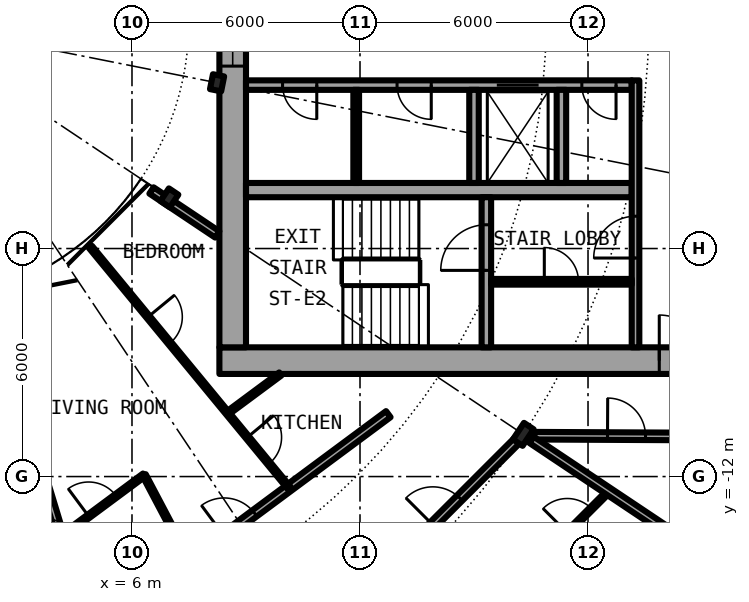
"""IFC4 building model, lengths in metres.
Left out: names, types, materials, properties, quantities, classifications, styles, units other than length and angle.
Written with IfcOpenShell. Run it as: python <this file> out.ifc"""

import sys

from ifc_helpers import new_model, si_unit, direction, frame, frame_2d, origin, origin_2d, place, context, subcontext, project, spatial, rectangle, i_section, extrude, element, fill, save


model = new_model("IFC4")
c1 = context("Model", 3, precision=1e-05, world=origin(), true_north=direction((0.0, 1.0)))
c2 = subcontext(c1, "Body", "Model", "MODEL_VIEW")
j1 = project(units=[si_unit("LENGTHUNIT", "METRE"), si_unit("PLANEANGLEUNIT", "RADIAN")], contexts=[c1])
p1 = place(None, origin())
s1 = spatial("IfcSite", under=j1, at=p1, CompositionType="ELEMENT")
p2 = place(p1, origin())
s2 = spatial("IfcBuilding", under=s1, at=p2, CompositionType="ELEMENT")
p3 = place(p2, frame((0.0, 0.0, 91.05)))
s3 = spatial("IfcBuildingStorey", under=s2, at=p3, CompositionType="ELEMENT", Elevation=91.05)
p4 = place(p3, frame((16.297, -10.889, 0.0), z_axis=(0.0, 0.0, 1.0), x_axis=(0.831469612303, -0.55557023302, 0.0)))
e1 = element("IfcColumn", 1, at=p4, inside=s3, PredefinedType="COLUMN", context=c2, shape_type="SweptSolid", body=[
    extrude(i_section(OverallWidth=0.306, OverallDepth=0.524, WebThickness=0.021, FlangeThickness=0.04, FilletRadius=0.027, at=origin_2d()), origin(), (0.0, 0.0, 1.0), 3.05),
])
for number, where, z_axis, x_axis in (
    (2, (6.984, -4.667, 0.0), (0.0, 0.0, 1.0), (0.831, -0.556, 0.0)),
    (3, (8.239, -1.639, 0.0), (0.0, 0.0, 1.0), (0.981, -0.195, 0.0)),
):
    element("IfcColumn", number, at=place(p3, frame(where, z_axis=z_axis, x_axis=x_axis)), inside=s3, PredefinedType="COLUMN", context=c2, shape_type="SweptSolid", body=[
        extrude(i_section(OverallWidth=0.3, OverallDepth=0.4, WebThickness=0.013, FlangeThickness=0.024, FilletRadius=0.027, at=origin_2d()), origin(), (0.0, 0.0, 1.0), 3.05),
    ])
p5 = place(p3, frame((8.3, -8.95, 0.0), z_axis=(0.0, 0.0, 1.0), x_axis=(1.0, 0.0, 0.0)))
e4 = element("IfcWall", 4, at=p5, inside=s3, PredefinedType="SHEAR", context=c2, shape_type="SweptSolid", body=[
    extrude(rectangle(XDim=14.0, YDim=0.7, at=frame_2d((7.0, 0.0))), origin(), (0.0, 0.0, 1.0), 3.05),
])
p6 = place(p5, frame((11.575, 0.0, 0.0)))
e5 = element("IfcOpeningElement", 5, at=p6, cuts=e4, PredefinedType="OPENING", context=c2, shape_type="SweptSolid", body=[
    extrude(rectangle(XDim=1.2, YDim=2.3, at=frame_2d((0.6, 1.15))), frame((0.0, 0.36, 0.0), z_axis=(0.0, -1.0, 0.0), x_axis=(1.0, 0.0, 0.0)), (0.0, 0.0, 1.0), 0.72),
])
p7 = place(p3, frame((8.65, -8.6, 0.0), z_axis=(0.0, 0.0, 1.0), x_axis=(0.0, 1.0, 0.0)))
e6 = element("IfcWall", 6, at=p7, inside=s3, PredefinedType="SHEAR", context=c2, shape_type="SweptSolid", body=[
    extrude(rectangle(XDim=17.2, YDim=0.7, at=frame_2d((8.6, 0.0))), origin(), (0.0, 0.0, 1.0), 3.05),
])
p8 = place(p7, frame((7.4, 0.0, 0.1)))
e7 = element("IfcOpeningElement", 7, at=p8, cuts=e6, PredefinedType="OPENING", context=c2, shape_type="SweptSolid", body=[
    extrude(rectangle(XDim=2.4, YDim=2.2, at=frame_2d((1.2, 1.1))), frame((0.0, 0.36, 0.0), z_axis=(0.0, -1.0, 0.0), x_axis=(1.0, 0.0, 0.0)), (0.0, 0.0, 1.0), 0.72),
])
p9 = place(p3, frame((19.15, -1.7, 0.0), z_axis=(0.0, 0.0, 1.0), x_axis=(-1.0, 0.0, 0.0)))
e8 = element("IfcWall", 8, at=p9, inside=s3, PredefinedType="SHEAR", context=c2, shape_type="SweptSolid", body=[
    extrude(rectangle(XDim=10.15, YDim=0.25, at=frame_2d((5.075, 0.0))), origin(), (0.0, 0.0, 1.0), 3.05),
])
p10 = place(p9, frame((2.45, 0.0, 0.0)))
e9 = element("IfcOpeningElement", 9, at=p10, cuts=e8, PredefinedType="OPENING", context=c2, shape_type="SweptSolid", body=[
    extrude(rectangle(XDim=1.1, YDim=2.3, at=frame_2d((0.55, 1.15))), frame((0.0, 0.135, 0.0), z_axis=(0.0, -1.0, 0.0), x_axis=(1.0, 0.0, 0.0)), (0.0, 0.0, 1.0), 0.27),
])
p11 = place(p9, frame((8.288, 0.0, 0.0)))
e10 = element("IfcOpeningElement", 10, at=p11, cuts=e8, PredefinedType="OPENING", context=c2, shape_type="SweptSolid", body=[
    extrude(rectangle(XDim=0.9, YDim=2.3, at=frame_2d((0.45, 1.15))), frame((0.0, 0.135, 0.0), z_axis=(0.0, -1.0, 0.0), x_axis=(1.0, 0.0, 0.0)), (0.0, 0.0, 1.0), 0.27),
])
p12 = place(p9, frame((5.275, 0.0, 0.0)))
e11 = element("IfcOpeningElement", 11, at=p12, cuts=e8, PredefinedType="OPENING", context=c2, shape_type="SweptSolid", body=[
    extrude(rectangle(XDim=0.9, YDim=2.3, at=frame_2d((0.45, 1.15))), frame((0.0, 0.135, 0.0), z_axis=(0.0, -1.0, 0.0), x_axis=(1.0, 0.0, 0.0)), (0.0, 0.0, 1.0), 0.27),
])
p13 = place(p9, frame((0.413, 0.0, 0.0)))
e12 = element("IfcOpeningElement", 12, at=p13, cuts=e8, PredefinedType="OPENING", context=c2, shape_type="SweptSolid", body=[
    extrude(rectangle(XDim=0.9, YDim=2.3, at=frame_2d((0.45, 1.15))), frame((0.0, 0.135, 0.0), z_axis=(0.0, -1.0, 0.0), x_axis=(1.0, 0.0, 0.0)), (0.0, 0.0, 1.0), 0.27),
])
p14 = place(p3, frame((9.0, -4.462, 0.0), z_axis=(0.0, 0.0, 1.0), x_axis=(1.0, 0.0, 0.0)))
e13 = element("IfcWall", 13, at=p14, inside=s3, PredefinedType="SHEAR", context=c2, shape_type="SweptSolid", body=[
    extrude(rectangle(XDim=10.15, YDim=0.375, at=frame_2d((5.075, 0.0))), origin(), (0.0, 0.0, 1.0), 3.05),
])
p15 = place(p3, frame((15.325, -8.6, 0.0), z_axis=(0.0, 0.0, 1.0), x_axis=(0.0, 1.0, 0.0)))
e14 = element("IfcWall", 14, at=p15, inside=s3, PredefinedType="SHEAR", context=c2, shape_type="SweptSolid", body=[
    extrude(rectangle(XDim=3.95, YDim=0.25, at=frame_2d((1.975, 0.0))), origin(), (0.0, 0.0, 1.0), 3.05),
])
p16 = place(p15, frame((2.025, 0.0, 0.0)))
e15 = element("IfcOpeningElement", 15, at=p16, cuts=e14, PredefinedType="OPENING", context=c2, shape_type="SweptSolid", body=[
    extrude(rectangle(XDim=1.2, YDim=2.3, at=frame_2d((0.6, 1.15))), frame((0.0, 0.135, 0.0), z_axis=(0.0, -1.0, 0.0), x_axis=(1.0, 0.0, 0.0)), (0.0, 0.0, 1.0), 0.27),
])
for number, where, z_axis, x_axis in (
    (16, (15.0, -1.825, 0.0), (0.0, 0.0, 1.0), (0.0, -1.0, 0.0)),
    (17, (17.3, -1.825, 0.0), (0.0, 0.0, 1.0), (0.0, -1.0, 0.0)),
):
    element("IfcWall", number, at=place(p3, frame(where, z_axis=z_axis, x_axis=x_axis)), inside=s3, PredefinedType="SOLIDWALL", context=c2, shape_type="SweptSolid", body=[
        extrude(rectangle(XDim=2.45, YDim=0.25, at=frame_2d((1.225, 0.0))), origin(), (0.0, 0.0, 1.0), 2.7),
    ])
p17 = place(p3, frame((19.25, -8.6, 0.0), z_axis=(0.0, 0.0, 1.0), x_axis=(0.0, 1.0, 0.0)))
e18 = element("IfcWall", 18, at=p17, inside=s3, PredefinedType="SOLIDWALL", context=c2, shape_type="SweptSolid", body=[
    extrude(rectangle(XDim=7.025, YDim=0.2, at=frame_2d((3.513, 0.0))), origin(), (0.0, 0.0, 1.0), 2.7),
])
p18 = place(p17, frame((2.35, 0.0, 0.0)))
e19 = element("IfcOpeningElement", 19, at=p18, cuts=e18, PredefinedType="OPENING", context=c2, shape_type="SweptSolid", body=[
    extrude(rectangle(XDim=1.1, YDim=2.3, at=frame_2d((0.55, 1.15))), frame((0.0, 0.11, 0.0), z_axis=(0.0, -1.0, 0.0), x_axis=(1.0, 0.0, 0.0)), (0.0, 0.0, 1.0), 0.22),
])
p19 = place(p3, frame((11.9, -1.825, 0.0), z_axis=(0.0, 0.0, 1.0), x_axis=(0.0, -1.0, 0.0)))
e20 = element("IfcWall", 20, at=p19, inside=s3, PredefinedType="PARTITIONING", context=c2, shape_type="SweptSolid", body=[
    extrude(rectangle(XDim=2.45, YDim=0.15, at=frame_2d((1.225, 0.0))), origin(), (0.0, 0.0, 1.0), 2.7),
])
p20 = place(p3, frame((15.45, -6.875, 0.0), z_axis=(0.0, 0.0, 1.0), x_axis=(1.0, 0.0, 0.0)))
e21 = element("IfcWall", 21, at=p20, inside=s3, PredefinedType="PARTITIONING", context=c2, shape_type="SweptSolid", body=[
    extrude(rectangle(XDim=3.7, YDim=0.15, at=frame_2d((1.85, 0.0))), origin(), (0.0, 0.0, 1.0), 2.7),
])
p21 = place(p20, frame((1.4, 0.0, 0.0)))
e22 = element("IfcOpeningElement", 22, at=p21, cuts=e21, PredefinedType="OPENING", context=c2, shape_type="SweptSolid", body=[
    extrude(rectangle(XDim=0.9, YDim=2.3, at=frame_2d((0.45, 1.15))), frame((0.0, 0.085, 0.0), z_axis=(0.0, -1.0, 0.0), x_axis=(1.0, 0.0, 0.0)), (0.0, 0.0, 1.0), 0.17),
])
p22 = place(p3, frame((15.468, -15.463, 0.0), z_axis=(0.0, 0.0, 1.0), x_axis=(0.707106781187, 0.707106781187, 0.0)))
e23 = element("IfcWall", 23, at=p22, inside=s3, PredefinedType="PARTITIONING", context=c2, shape_type="SweptSolid", body=[
    extrude(rectangle(XDim=4.351, YDim=0.1, at=frame_2d((2.176, 0.0))), origin(), (0.0, 0.0, 1.0), 2.7),
])
p23 = place(p22, frame((2.808, 0.0, 0.0)))
e24 = element("IfcOpeningElement", 24, at=p23, cuts=e23, PredefinedType="OPENING", context=c2, shape_type="SweptSolid", body=[
    extrude(rectangle(XDim=0.9, YDim=2.3, at=frame_2d((0.45, 1.15))), frame((0.0, 0.06, 0.0), z_axis=(0.0, -1.0, 0.0), x_axis=(1.0, 0.0, 0.0)), (0.0, 0.0, 1.0), 0.12),
])
p24 = place(p3, frame((11.0, -16.186, 0.0), z_axis=(0.0, 0.0, 1.0), x_axis=(0.707106781187, 0.707106781187, 0.0)))
e25 = element("IfcWall", 25, at=p24, inside=s3, PredefinedType="PARTITIONING", context=c2, shape_type="SweptSolid", body=[
    extrude(rectangle(XDim=7.334, YDim=0.2, at=frame_2d((3.667, 0.0))), origin(), (0.0, 0.0, 1.0), 2.38),
])
p25 = place(p24, frame((4.123, 0.0, 0.0)))
e26 = element("IfcOpeningElement", 26, at=p25, cuts=e25, PredefinedType="OPENING", context=c2, shape_type="SweptSolid", body=[
    extrude(rectangle(XDim=1.0, YDim=2.3, at=frame_2d((0.5, 1.15))), frame((0.0, 0.11, 0.0), z_axis=(0.0, -1.0, 0.0), x_axis=(1.0, 0.0, 0.0)), (0.0, 0.0, 1.0), 0.22),
])
p26 = place(p3, frame((4.906, -16.172, 0.0), z_axis=(0.0, 0.0, 1.0), x_axis=(0.803191461888, 0.595720971219, 0.0)))
e27 = element("IfcWall", 27, at=p26, inside=s3, PredefinedType="PARTITIONING", context=c2, shape_type="SweptSolid", body=[
    extrude(rectangle(XDim=9.76, YDim=0.2, at=frame_2d((4.88, 0.0))), origin(), (0.0, 0.0, 1.0), 2.7),
])
p27 = place(p26, frame((4.38, 0.0, 0.0)))
e28 = element("IfcOpeningElement", 28, at=p27, cuts=e27, PredefinedType="OPENING", context=c2, shape_type="SweptSolid", body=[
    extrude(rectangle(XDim=1.0, YDim=2.3, at=frame_2d((0.5, 1.15))), frame((0.0, 0.11, 0.0), z_axis=(0.0, -1.0, 0.0), x_axis=(1.0, 0.0, 0.0)), (0.0, 0.0, 1.0), 0.22),
])
p28 = place(p3, frame((4.123, -13.589, 0.0), z_axis=(0.0, 0.0, 1.0), x_axis=(0.803128348509, 0.595806055542, 0.0)))
e29 = element("IfcWall", 29, at=p28, inside=s3, PredefinedType="PARTITIONING", context=c2, shape_type="SweptSolid", body=[
    extrude(rectangle(XDim=2.734, YDim=0.1, at=frame_2d((1.367, 0.0))), origin(), (0.0, 0.0, 1.0), 2.7),
])
p29 = place(p28, frame((0.916, 0.0, 0.0)))
e30 = element("IfcOpeningElement", 30, at=p29, cuts=e29, PredefinedType="OPENING", context=c2, shape_type="SweptSolid", body=[
    extrude(rectangle(XDim=0.9, YDim=2.3, at=frame_2d((0.45, 1.15))), frame((0.0, 0.06, 0.0), z_axis=(0.0, -1.0, 0.0), x_axis=(1.0, 0.0, 0.0)), (0.0, 0.0, 1.0), 0.12),
])
p30 = place(p3, frame((8.513, -10.332, 0.0), z_axis=(0.0, 0.0, 1.0), x_axis=(0.803135014325, 0.595797070121, 0.0)))
e31 = element("IfcWall", 31, at=p30, inside=s3, PredefinedType="PARTITIONING", context=c2, shape_type="SweptSolid", body=[
    extrude(rectangle(XDim=1.732, YDim=0.1, at=frame_2d((0.866, 0.0))), origin(), (0.0, 0.0, 1.0), 2.7),
])
p31 = place(p3, frame((16.588, -10.925, 0.0), z_axis=(0.0, 0.0, 1.0), x_axis=(0.999988019025, -0.004895079807, 0.0)))
e32 = element("IfcWall", 32, at=p31, inside=s3, PredefinedType="PARTITIONING", context=c2, shape_type="SweptSolid", body=[
    extrude(rectangle(XDim=5.087, YDim=0.2, at=frame_2d((2.543, 0.0))), origin(), (0.0, 0.0, 1.0), 2.7),
])
p32 = place(p31, frame((1.925, 0.0, 0.0)))
e33 = element("IfcOpeningElement", 33, at=p32, cuts=e32, PredefinedType="OPENING", context=c2, shape_type="SweptSolid", body=[
    extrude(rectangle(XDim=1.0, YDim=2.3, at=frame_2d((0.5, 1.15))), frame((0.0, 0.11, 0.0), z_axis=(0.0, -1.0, 0.0), x_axis=(1.0, 0.0, 0.0)), (0.0, 0.0, 1.0), 0.22),
])
p33 = place(p3, frame((6.513, -4.472, 0.0), z_axis=(0.0, 0.0, 1.0), x_axis=(0.831382204863, -0.555701025225, 0.0)))
e34 = element("IfcWall", 34, at=p33, inside=s3, PredefinedType="PARTITIONING", context=c2, shape_type="SweptSolid", body=[
    extrude(rectangle(XDim=2.082, YDim=0.2, at=frame_2d((1.041, 0.0))), origin(), (0.0, 0.0, 1.0), 2.7),
])
p34 = place(p3, frame((2.242, -7.388, 0.0), z_axis=(0.0, 0.0, 1.0), x_axis=(0.290225889812, -0.956958166736, 0.0)))
e35 = element("IfcWall", 35, at=p34, inside=s3, PredefinedType="PARTITIONING", context=c2, shape_type="SweptSolid", body=[
    extrude(rectangle(XDim=9.179, YDim=0.2, at=frame_2d((4.59, 0.0))), origin(), (0.0, 0.0, 1.0), 2.7),
])
p35 = place(p3, frame((4.908, -5.959, 0.0), z_axis=(0.0, 0.0, 1.0), x_axis=(0.636105207978, -0.771602335652, 0.0)))
e36 = element("IfcWall", 36, at=p35, inside=s3, PredefinedType="PARTITIONING", context=c2, shape_type="SweptSolid", body=[
    extrude(rectangle(XDim=8.213, YDim=0.1, at=frame_2d((4.106, 0.0))), origin(), (0.0, 0.0, 1.0), 2.7),
])
p36 = place(p35, frame((6.49, 0.0, 0.0)))
e37 = element("IfcOpeningElement", 37, at=p36, cuts=e36, PredefinedType="OPENING", context=c2, shape_type="SweptSolid", body=[
    extrude(rectangle(XDim=0.9, YDim=2.3, at=frame_2d((0.45, 1.15))), frame((0.0, 0.06, 0.0), z_axis=(0.0, -1.0, 0.0), x_axis=(1.0, 0.0, 0.0)), (0.0, 0.0, 1.0), 0.12),
])
p37 = place(p35, frame((2.384, 0.0, 0.0)))
e38 = element("IfcOpeningElement", 38, at=p37, cuts=e36, PredefinedType="OPENING", context=c2, shape_type="SweptSolid", body=[
    extrude(rectangle(XDim=0.9, YDim=2.3, at=frame_2d((0.45, 1.15))), frame((0.0, 0.06, 0.0), z_axis=(0.0, -1.0, 0.0), x_axis=(1.0, 0.0, 0.0)), (0.0, 0.0, 1.0), 0.12),
])
p38 = place(p3, frame((6.317, -11.96, 0.0), z_axis=(0.0, 0.0, 1.0), x_axis=(0.466880254022, -0.884320546185, 0.0)))
e39 = element("IfcWall", 39, at=p38, inside=s3, PredefinedType="PARTITIONING", context=c2, shape_type="SweptSolid", body=[
    extrude(rectangle(XDim=2.573, YDim=0.1, at=frame_2d((1.286, 0.0))), origin(), (0.0, 0.0, 1.0), 2.7),
])
p39 = place(p3, frame((16.515, -11.035, 0.0), z_axis=(0.0, 0.0, 1.0), x_axis=(0.831505405283, -0.555516661303, 0.0)))
e40 = element("IfcWall", 40, at=p39, inside=s3, PredefinedType="PARTITIONING", context=c2, shape_type="SweptSolid", body=[
    extrude(rectangle(XDim=7.312, YDim=0.2, at=frame_2d((3.656, 0.0))), origin(), (0.0, 0.0, 1.0), 2.7),
])
p40 = place(p10, origin())
e41 = element("IfcDoor", 41, at=p40, inside=s3, OperationType="DOUBLE_DOOR_SLIDING", PredefinedType="DOOR", context=c2, shape_type="SweptSolid", body=[
    extrude(rectangle(XDim=1.1, YDim=2.3, at=frame_2d((0.55, 1.15))), frame((0.0, 0.025, 0.0), z_axis=(0.0, -1.0, 0.0), x_axis=(1.0, 0.0, 0.0)), (0.0, 0.0, 1.0), 0.05),
])
fill(e9, e41)
p41 = place(p11, origin())
e42 = element("IfcDoor", 42, at=p41, inside=s3, OperationType="SINGLE_SWING_LEFT", PredefinedType="DOOR", context=c2, shape_type="SweptSolid", body=[
    extrude(rectangle(XDim=0.9, YDim=2.3, at=frame_2d((0.45, 1.15))), frame((0.0, 0.025, 0.0), z_axis=(0.0, -1.0, 0.0), x_axis=(1.0, 0.0, 0.0)), (0.0, 0.0, 1.0), 0.05),
])
fill(e10, e42)
p42 = place(p12, origin())
e43 = element("IfcDoor", 43, at=p42, inside=s3, OperationType="SINGLE_SWING_LEFT", PredefinedType="DOOR", context=c2, shape_type="SweptSolid", body=[
    extrude(rectangle(XDim=0.9, YDim=2.3, at=frame_2d((0.45, 1.15))), frame((0.0, 0.025, 0.0), z_axis=(0.0, -1.0, 0.0), x_axis=(1.0, 0.0, 0.0)), (0.0, 0.0, 1.0), 0.05),
])
fill(e11, e43)
p43 = place(p13, origin())
e44 = element("IfcDoor", 44, at=p43, inside=s3, OperationType="SINGLE_SWING_RIGHT", PredefinedType="DOOR", context=c2, shape_type="SweptSolid", body=[
    extrude(rectangle(XDim=0.9, YDim=2.3, at=frame_2d((0.45, 1.15))), frame((0.0, 0.025, 0.0), z_axis=(0.0, -1.0, 0.0), x_axis=(1.0, 0.0, 0.0)), (0.0, 0.0, 1.0), 0.05),
])
fill(e12, e44)
p44 = place(p21, origin())
e45 = element("IfcDoor", 45, at=p44, inside=s3, OperationType="SINGLE_SWING_LEFT", PredefinedType="DOOR", context=c2, shape_type="SweptSolid", body=[
    extrude(rectangle(XDim=0.9, YDim=2.3, at=frame_2d((0.45, 1.15))), frame((0.0, 0.025, 0.0), z_axis=(0.0, -1.0, 0.0), x_axis=(1.0, 0.0, 0.0)), (0.0, 0.0, 1.0), 0.05),
])
fill(e22, e45)
p45 = place(p16, origin())
e46 = element("IfcDoor", 46, at=p45, inside=s3, OperationType="SINGLE_SWING_LEFT", PredefinedType="DOOR", context=c2, shape_type="SweptSolid", body=[
    extrude(rectangle(XDim=1.2, YDim=2.3, at=frame_2d((0.6, 1.15))), frame((0.0, 0.025, 0.0), z_axis=(0.0, -1.0, 0.0), x_axis=(1.0, 0.0, 0.0)), (0.0, 0.0, 1.0), 0.05),
])
fill(e15, e46)
p46 = place(p18, origin())
e47 = element("IfcDoor", 47, at=p46, inside=s3, OperationType="SINGLE_SWING_RIGHT", PredefinedType="DOOR", context=c2, shape_type="SweptSolid", body=[
    extrude(rectangle(XDim=1.1, YDim=2.3, at=frame_2d((0.55, 1.15))), frame((0.0, 0.025, 0.0), z_axis=(0.0, -1.0, 0.0), x_axis=(1.0, 0.0, 0.0)), (0.0, 0.0, 1.0), 0.05),
])
fill(e19, e47)
p47 = place(p6, origin())
e48 = element("IfcDoor", 48, at=p47, inside=s3, OperationType="SINGLE_SWING_LEFT", PredefinedType="DOOR", context=c2, shape_type="SweptSolid", body=[
    extrude(rectangle(XDim=1.2, YDim=2.3, at=frame_2d((0.6, 1.15))), frame((0.0, 0.025, 0.0), z_axis=(0.0, -1.0, 0.0), x_axis=(1.0, 0.0, 0.0)), (0.0, 0.0, 1.0), 0.05),
])
fill(e5, e48)
p48 = place(p8, origin())
e49 = element("IfcWindow", 49, at=p48, inside=s3, PartitioningType="SINGLE_PANEL", PredefinedType="WINDOW", context=c2, shape_type="SweptSolid", body=[
    extrude(rectangle(XDim=2.4, YDim=2.2, at=frame_2d((1.2, 1.1))), frame((0.0, 0.03, 0.0), z_axis=(0.0, -1.0, 0.0), x_axis=(1.0, 0.0, 0.0)), (0.0, 0.0, 1.0), 0.06),
])
fill(e7, e49)
p49 = place(p25, origin())
e50 = element("IfcDoor", 50, at=p49, inside=s3, OperationType="SINGLE_SWING_RIGHT", PredefinedType="DOOR", context=c2, shape_type="SweptSolid", body=[
    extrude(rectangle(XDim=1.0, YDim=2.3, at=frame_2d((0.5, 1.15))), frame((0.0, 0.025, 0.0), z_axis=(0.0, -1.0, 0.0), x_axis=(1.0, 0.0, 0.0)), (0.0, 0.0, 1.0), 0.05),
])
fill(e26, e50)
p50 = place(p23, origin())
e51 = element("IfcDoor", 51, at=p50, inside=s3, OperationType="SINGLE_SWING_RIGHT", PredefinedType="DOOR", context=c2, shape_type="SweptSolid", body=[
    extrude(rectangle(XDim=0.9, YDim=2.3, at=frame_2d((0.45, 1.15))), frame((0.0, 0.025, 0.0), z_axis=(0.0, -1.0, 0.0), x_axis=(1.0, 0.0, 0.0)), (0.0, 0.0, 1.0), 0.05),
])
fill(e24, e51)
p51 = place(p27, origin())
e52 = element("IfcDoor", 52, at=p51, inside=s3, OperationType="SINGLE_SWING_LEFT", PredefinedType="DOOR", context=c2, shape_type="SweptSolid", body=[
    extrude(rectangle(XDim=1.0, YDim=2.3, at=frame_2d((0.5, 1.15))), frame((0.0, 0.025, 0.0), z_axis=(0.0, -1.0, 0.0), x_axis=(1.0, 0.0, 0.0)), (0.0, 0.0, 1.0), 0.05),
])
fill(e28, e52)
p52 = place(p29, origin())
e53 = element("IfcDoor", 53, at=p52, inside=s3, OperationType="SINGLE_SWING_LEFT", PredefinedType="DOOR", context=c2, shape_type="SweptSolid", body=[
    extrude(rectangle(XDim=0.9, YDim=2.3, at=frame_2d((0.45, 1.15))), frame((0.0, 0.025, 0.0), z_axis=(0.0, -1.0, 0.0), x_axis=(1.0, 0.0, 0.0)), (0.0, 0.0, 1.0), 0.05),
])
fill(e30, e53)
p53 = place(p36, origin())
e54 = element("IfcDoor", 54, at=p53, inside=s3, OperationType="SINGLE_SWING_RIGHT", PredefinedType="DOOR", context=c2, shape_type="SweptSolid", body=[
    extrude(rectangle(XDim=0.9, YDim=2.3, at=frame_2d((0.45, 1.15))), frame((0.0, 0.025, 0.0), z_axis=(0.0, -1.0, 0.0), x_axis=(1.0, 0.0, 0.0)), (0.0, 0.0, 1.0), 0.05),
])
fill(e37, e54)
p54 = place(p37, origin())
e55 = element("IfcDoor", 55, at=p54, inside=s3, OperationType="SINGLE_SWING_LEFT", PredefinedType="DOOR", context=c2, shape_type="SweptSolid", body=[
    extrude(rectangle(XDim=0.9, YDim=2.3, at=frame_2d((0.45, 1.15))), frame((0.0, 0.025, 0.0), z_axis=(0.0, -1.0, 0.0), x_axis=(1.0, 0.0, 0.0)), (0.0, 0.0, 1.0), 0.05),
])
fill(e38, e55)
p55 = place(p32, origin())
e56 = element("IfcDoor", 56, at=p55, inside=s3, OperationType="SINGLE_SWING_LEFT", PredefinedType="DOOR", context=c2, shape_type="SweptSolid", body=[
    extrude(rectangle(XDim=1.0, YDim=2.3, at=frame_2d((0.5, 1.15))), frame((0.0, 0.025, 0.0), z_axis=(0.0, -1.0, 0.0), x_axis=(1.0, 0.0, 0.0)), (0.0, 0.0, 1.0), 0.05),
])
fill(e33, e56)
save(model, sys.argv[1])
